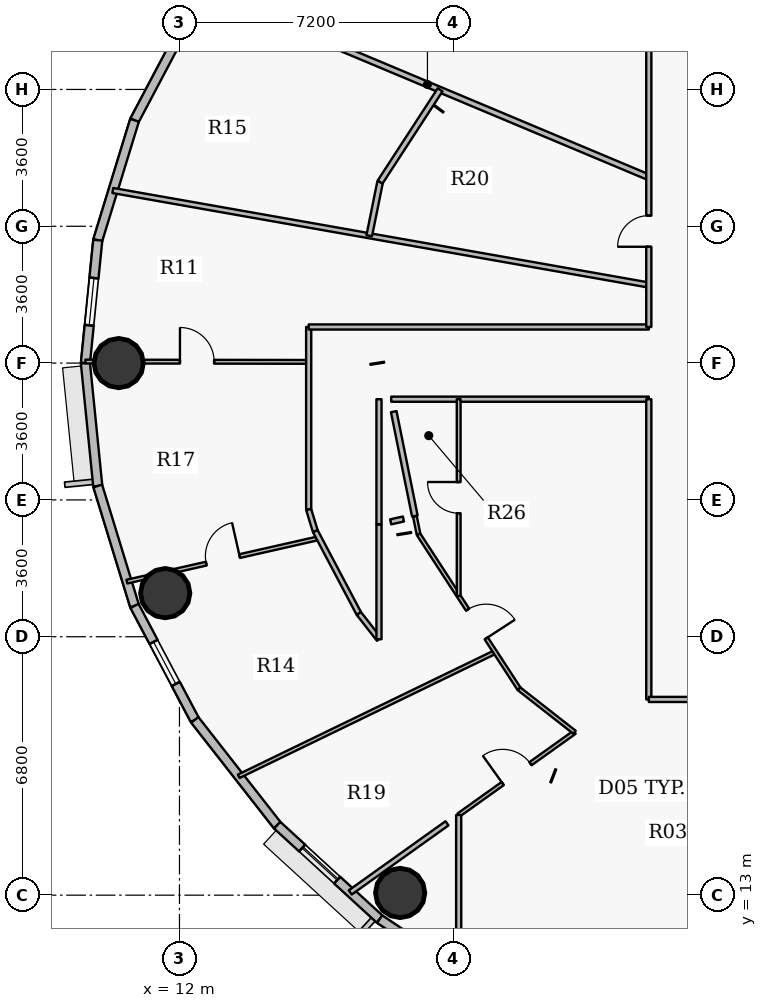
"""IFC4 building model, lengths in metres.
Left out: names, types, materials, properties, quantities, classifications, styles, units other than length and angle.
Written with IfcOpenShell. Run it as: python <this file> out.ifc"""

import sys

from ifc_helpers import new_model, si_unit, direction, frame, frame_2d, origin, origin_2d, place, context, subcontext, project, spatial, rectangle, hollow_circle, extrude, source, transform, mapped, element, fill, save


model = new_model("IFC4")
c1 = context("Model", 3, precision=1e-05, world=origin(), true_north=direction((0.0, 1.0)))
c2 = subcontext(c1, "Body", "Model", "MODEL_VIEW")
j1 = project(units=[si_unit("LENGTHUNIT", "METRE"), si_unit("PLANEANGLEUNIT", "RADIAN")], contexts=[c1])
p1 = place(None, origin())
s1 = spatial("IfcSite", under=j1, at=p1, CompositionType="ELEMENT")
p2 = place(p1, origin())
s2 = spatial("IfcBuilding", under=s1, at=p2, CompositionType="ELEMENT")
p3 = place(p2, frame((0.0, 0.0, 189.9)))
s3 = spatial("IfcBuildingStorey", under=s2, at=p3, CompositionType="ELEMENT", Elevation=189.9)
for number, where, z_axis, x_axis in (
    (1, (10.4, 27.0, 0.0), (0.0, 0.0, 1.0), (1.0, 0.0, 0.0)),
    (2, (11.625, 20.947, 0.0), (0.0, 0.0, 1.0), (1.0, 0.0, 0.0)),
    (3, (17.808, 13.058, 0.0), (0.0, 0.0, 1.0), (1.0, 0.0, 0.0)),
):
    element("IfcColumn", number, at=place(p3, frame(where, z_axis=z_axis, x_axis=x_axis)), inside=s3, PredefinedType="COLUMN", context=c2, shape_type="SweptSolid", body=[
        extrude(hollow_circle(Radius=0.65, WallThickness=0.04, at=origin_2d()), origin(), (0.0, 0.0, 1.0), 3.75),
    ])
p4 = place(p3, frame((10.817, 33.389, 0.0), z_axis=(0.0, 0.0, 1.0), x_axis=(0.467586874938, 0.88394712194, 0.0)))
e4 = element("IfcWall", 4, at=p4, inside=s3, PredefinedType="SOLIDWALL", context=c2, shape_type="SweptSolid", body=[
    extrude(rectangle(XDim=3.393, YDim=0.24, at=frame_2d((1.697, 0.0))), origin(), (0.0, 0.0, 1.0), 3.5),
])
p5 = place(p3, frame((9.85, 30.234, 0.0), z_axis=(0.0, 0.0, 1.0), x_axis=(0.293097995113, 0.956082405058, 0.0)))
e5 = element("IfcWall", 5, at=p5, inside=s3, PredefinedType="SOLIDWALL", context=c2, shape_type="SweptSolid", body=[
    extrude(rectangle(XDim=3.3, YDim=0.24, at=frame_2d((1.65, 0.0))), origin(), (0.0, 0.0, 1.0), 3.5),
])
p6 = place(p3, frame((9.525, 27.0, 0.0), z_axis=(0.0, 0.0, 1.0), x_axis=(0.100061534614, 0.994981250723, 0.0)))
e6 = element("IfcWall", 6, at=p6, inside=s3, PredefinedType="SOLIDWALL", context=c2, shape_type="SweptSolid", body=[
    extrude(rectangle(XDim=3.25, YDim=0.24, at=frame_2d((1.625, 0.0))), origin(), (0.0, 0.0, 1.0), 3.5),
])
p7 = place(p6, frame((1.0, 0.0, 0.9)))
e7 = element("IfcOpeningElement", 7, at=p7, cuts=e6, PredefinedType="OPENING", context=c2, shape_type="SweptSolid", body=[
    extrude(rectangle(XDim=1.25, YDim=1.65, at=origin_2d()), frame((0.625, 0.13, 0.825), z_axis=(0.0, -1.0, 0.0), x_axis=(1.0, 0.0, 0.0)), (0.0, 0.0, 1.0), 0.26),
])
p8 = place(p3, frame((9.85, 23.766, 0.0), z_axis=(0.0, 0.0, 1.0), x_axis=(-0.100061534614, 0.994981250723, 0.0)))
e8 = element("IfcWall", 8, at=p8, inside=s3, PredefinedType="SOLIDWALL", context=c2, shape_type="SweptSolid", body=[
    extrude(rectangle(XDim=3.25, YDim=0.24, at=frame_2d((1.625, 0.0))), origin(), (0.0, 0.0, 1.0), 3.5),
])
p9 = place(p3, frame((10.817, 20.611, 0.0), z_axis=(0.0, 0.0, 1.0), x_axis=(-0.293097995113, 0.956082405058, 0.0)))
e9 = element("IfcWall", 9, at=p9, inside=s3, PredefinedType="SOLIDWALL", context=c2, shape_type="SweptSolid", body=[
    extrude(rectangle(XDim=3.3, YDim=0.24, at=frame_2d((1.65, 0.0))), origin(), (0.0, 0.0, 1.0), 3.5),
])
p10 = place(p3, frame((12.404, 17.612, 0.0), z_axis=(0.0, 0.0, 1.0), x_axis=(-0.467586874938, 0.88394712194, 0.0)))
e10 = element("IfcWall", 10, at=p10, inside=s3, PredefinedType="SOLIDWALL", context=c2, shape_type="SweptSolid", body=[
    extrude(rectangle(XDim=3.393, YDim=0.24, at=frame_2d((1.697, 0.0))), origin(), (0.0, 0.0, 1.0), 3.5),
])
p11 = place(p10, frame((1.072, 0.0, 0.9)))
e11 = element("IfcOpeningElement", 11, at=p11, cuts=e10, PredefinedType="OPENING", context=c2, shape_type="SweptSolid", body=[
    extrude(rectangle(XDim=1.25, YDim=1.65, at=origin_2d()), frame((0.625, 0.13, 0.825), z_axis=(0.0, -1.0, 0.0), x_axis=(1.0, 0.0, 0.0)), (0.0, 0.0, 1.0), 0.26),
])
p12 = place(p3, frame((14.572, 14.842, 0.0), z_axis=(0.0, 0.0, 1.0), x_axis=(-0.616287674549, 0.787521112224, 0.0)))
e12 = element("IfcWall", 12, at=p12, inside=s3, PredefinedType="SOLIDWALL", context=c2, shape_type="SweptSolid", body=[
    extrude(rectangle(XDim=3.517, YDim=0.24, at=frame_2d((1.759, 0.0))), origin(), (0.0, 0.0, 1.0), 3.5),
])
p13 = place(p3, frame((17.268, 12.369, 0.0), z_axis=(0.0, 0.0, 1.0), x_axis=(-0.737076565834, 0.675809245349, 0.0)))
e13 = element("IfcWall", 13, at=p13, inside=s3, PredefinedType="SOLIDWALL", context=c2, shape_type="SweptSolid", body=[
    extrude(rectangle(XDim=3.658, YDim=0.24, at=frame_2d((1.829, 0.0))), origin(), (0.0, 0.0, 1.0), 3.5),
])
p14 = place(p13, frame((1.518, 0.0, 0.9)))
e14 = element("IfcOpeningElement", 14, at=p14, cuts=e13, PredefinedType="OPENING", context=c2, shape_type="SweptSolid", body=[
    extrude(rectangle(XDim=1.25, YDim=1.65, at=origin_2d()), frame((0.625, 0.13, 0.825), z_axis=(0.0, -1.0, 0.0), x_axis=(1.0, 0.0, 0.0)), (0.0, 0.0, 1.0), 0.26),
])
p15 = place(p3, frame((20.427, 10.257, 0.0), z_axis=(0.0, 0.0, 1.0), x_axis=(-0.831228998277, 0.555930168657, 0.0)))
e15 = element("IfcWall", 15, at=p15, inside=s3, PredefinedType="SOLIDWALL", context=c2, shape_type="SweptSolid", body=[
    extrude(rectangle(XDim=3.8, YDim=0.24, at=frame_2d((1.9, 0.0))), origin(), (0.0, 0.0, 1.0), 3.5),
])
p16 = place(p3, frame((9.524, 27.041, 0.0), z_axis=(0.0, 0.0, 1.0), x_axis=(0.999998818241, -0.001537373012, 0.0)))
e16 = element("IfcWall", 16, at=p16, inside=s3, PredefinedType="PARTITIONING", context=c2, shape_type="SweptSolid", body=[
    extrude(rectangle(XDim=5.876, YDim=0.1, at=frame_2d((2.938, 0.0))), origin(), (0.0, 0.0, 1.0), 2.935),
])
p17 = place(p16, frame((2.488, 0.0, 0.0)))
e17 = element("IfcOpeningElement", 17, at=p17, cuts=e16, PredefinedType="OPENING", context=c2, shape_type="SweptSolid", body=[
    extrude(rectangle(XDim=0.9, YDim=2.1, at=origin_2d()), frame((0.45, 0.06, 1.05), z_axis=(0.0, -1.0, 0.0), x_axis=(1.0, 0.0, 0.0)), (0.0, 0.0, 1.0), 0.12),
])
p18 = place(p3, frame((10.246, 31.541, 0.0), z_axis=(0.0, 0.0, 1.0), x_axis=(0.984807060168, -0.173652106936, 0.0)))
e18 = element("IfcWall", 18, at=p18, inside=s3, PredefinedType="PARTITIONING", context=c2, shape_type="SweptSolid", body=[
    extrude(rectangle(XDim=14.322, YDim=0.135, at=frame_2d((7.161, 0.0))), origin(), (0.0, 0.0, 1.0), 2.935),
])
p19 = place(p3, frame((10.616, 21.25, 0.0), z_axis=(0.0, 0.0, 1.0), x_axis=(0.975289939743, 0.220928797208, 0.0)))
e19 = element("IfcWall", 19, at=p19, inside=s3, PredefinedType="PARTITIONING", context=c2, shape_type="SweptSolid", body=[
    extrude(rectangle(XDim=5.183, YDim=0.1, at=frame_2d((2.591, 0.0))), origin(), (0.0, 0.0, 1.0), 2.935),
])
p20 = place(p19, frame((2.141, 0.0, 0.0)))
e20 = element("IfcOpeningElement", 20, at=p20, cuts=e19, PredefinedType="OPENING", context=c2, shape_type="SweptSolid", body=[
    extrude(rectangle(XDim=0.9, YDim=2.1, at=origin_2d()), frame((0.45, 0.06, 1.05), z_axis=(0.0, -1.0, 0.0), x_axis=(1.0, 0.0, 0.0)), (0.0, 0.0, 1.0), 0.12),
])
p21 = place(p3, frame((12.7, 36.775, 0.0), z_axis=(0.0, 0.0, 1.0), x_axis=(0.922134788074, -0.386868753745, 0.0)))
e21 = element("IfcWall", 21, at=p21, inside=s3, PredefinedType="PARTITIONING", context=c2, shape_type="SweptSolid", body=[
    extrude(rectangle(XDim=12.633, YDim=0.15, at=frame_2d((6.317, 0.0))), origin(), (0.0, 0.0, 1.0), 2.935),
])
p22 = place(p21, frame((2.834, 0.0, 0.0)))
e22 = element("IfcOpeningElement", 22, at=p22, cuts=e21, PredefinedType="OPENING", context=c2, shape_type="SweptSolid", body=[
    extrude(rectangle(XDim=1.05, YDim=2.15, at=origin_2d()), frame((0.525, 0.085, 1.075), z_axis=(0.0, -1.0, 0.0), x_axis=(1.0, 0.0, 0.0)), (0.0, 0.0, 1.0), 0.17),
])
p23 = place(p3, frame((13.559, 16.128, 0.0), z_axis=(0.0, 0.0, 1.0), x_axis=(0.899957370901, 0.43597790146, 0.0)))
e23 = element("IfcWall", 23, at=p23, inside=s3, PredefinedType="PARTITIONING", context=c2, shape_type="SweptSolid", body=[
    extrude(rectangle(XDim=7.498, YDim=0.1, at=frame_2d((3.749, 0.0))), origin(), (0.0, 0.0, 1.0), 2.935),
])
p24 = place(p3, frame((15.4, 23.146, 0.0), z_axis=(0.0, 0.0, 1.0), x_axis=(0.0, 1.0, 0.0)))
e24 = element("IfcWall", 24, at=p24, inside=s3, PredefinedType="PARTITIONING", context=c2, shape_type="SweptSolid", body=[
    extrude(rectangle(XDim=4.804, YDim=0.135, at=frame_2d((2.402, 0.0))), origin(), (0.0, 0.0, 1.0), 2.935),
])
p25 = place(p3, frame((15.4, 23.146, 0.0), z_axis=(0.0, 0.0, 1.0), x_axis=(0.293335154151, -0.956009669061, 0.0)))
e25 = element("IfcWall", 25, at=p25, inside=s3, PredefinedType="PARTITIONING", context=c2, shape_type="SweptSolid", body=[
    extrude(rectangle(XDim=0.594, YDim=0.135, at=frame_2d((0.297, 0.0))), origin(), (0.0, 0.0, 1.0), 3.5),
])
p26 = place(p3, frame((15.4, 27.95, 0.0), z_axis=(0.0, 0.0, 1.0), x_axis=(1.0, 0.0, 0.0)))
e26 = element("IfcWall", 26, at=p26, inside=s3, PredefinedType="PARTITIONING", context=c2, shape_type="SweptSolid", body=[
    extrude(rectangle(XDim=8.95, YDim=0.135, at=frame_2d((4.475, 0.0))), origin(), (0.0, 0.0, 1.0), 3.5),
])
p27 = place(p3, frame((15.574, 22.578, 0.0), z_axis=(0.0, 0.0, 1.0), x_axis=(0.467613130075, -0.883933233102, 0.0)))
e27 = element("IfcWall", 27, at=p27, inside=s3, PredefinedType="PARTITIONING", context=c2, shape_type="SweptSolid", body=[
    extrude(rectangle(XDim=2.451, YDim=0.135, at=frame_2d((1.226, 0.0))), origin(), (0.0, 0.0, 1.0), 2.935),
])
p28 = place(p3, frame((16.72, 20.411, 0.0), z_axis=(0.0, 0.0, 1.0), x_axis=(0.616377221056, -0.787451027914, 0.0)))
e28 = element("IfcWall", 28, at=p28, inside=s3, PredefinedType="PARTITIONING", context=c2, shape_type="SweptSolid", body=[
    extrude(rectangle(XDim=0.859, YDim=0.135, at=frame_2d((0.43, 0.0))), origin(), (0.0, 0.0, 1.0), 3.5),
])
p29 = place(p3, frame((16.994, 30.351, 0.0), z_axis=(0.0, 0.0, 1.0), x_axis=(0.198136589313, 0.98017441916, 0.0)))
e29 = element("IfcWall", 29, at=p29, inside=s3, PredefinedType="PARTITIONING", context=c2, shape_type="SweptSolid", body=[
    extrude(rectangle(XDim=1.44, YDim=0.15, at=frame_2d((0.72, 0.0))), origin(), (0.0, 0.0, 1.0), 3.5),
])
p30 = place(p3, frame((17.25, 19.734, 0.0), z_axis=(0.0, 0.0, 1.0), x_axis=(0.0, 1.0, 0.0)))
e30 = element("IfcWall", 30, at=p30, inside=s3, PredefinedType="PARTITIONING", context=c2, shape_type="SweptSolid", body=[
    extrude(rectangle(XDim=3.018, YDim=0.135, at=frame_2d((1.509, 0.0))), origin(), (0.0, 0.0, 1.0), 2.935),
])
p31 = place(p3, frame((17.279, 31.763, 0.0), z_axis=(0.0, 0.0, 1.0), x_axis=(0.545388220317, 0.8381835653, 0.0)))
e31 = element("IfcWall", 31, at=p31, inside=s3, PredefinedType="PARTITIONING", context=c2, shape_type="SweptSolid", body=[
    extrude(rectangle(XDim=2.897, YDim=0.15, at=frame_2d((1.448, 0.0))), origin(), (0.0, 0.0, 1.0), 2.935),
])
p32 = place(p3, frame((17.572, 26.05, 0.0), z_axis=(0.0, 0.0, 1.0), x_axis=(1.0, 0.0, 0.0)))
e32 = element("IfcWall", 32, at=p32, inside=s3, PredefinedType="PARTITIONING", context=c2, shape_type="SweptSolid", body=[
    extrude(rectangle(XDim=6.778, YDim=0.135, at=frame_2d((3.389, 0.0))), origin(), (0.0, 0.0, 1.0), 3.5),
])
p33 = place(p3, frame((18.196, 22.967, 0.0), z_axis=(0.0, 0.0, 1.0), x_axis=(0.197965751338, -0.980208937573, 0.0)))
e33 = element("IfcWall", 33, at=p33, inside=s3, PredefinedType="PARTITIONING", context=c2, shape_type="SweptSolid", body=[
    extrude(rectangle(XDim=0.482, YDim=0.1, at=frame_2d((0.241, 0.0))), origin(), (0.0, 0.0, 1.0), 2.935),
])
p34 = place(p3, frame((18.291, 22.494, 0.0), z_axis=(0.0, 0.0, 1.0), x_axis=(0.545382906853, -0.838187022634, 0.0)))
e34 = element("IfcWall", 34, at=p34, inside=s3, PredefinedType="PARTITIONING", context=c2, shape_type="SweptSolid", body=[
    extrude(rectangle(XDim=4.849, YDim=0.1, at=frame_2d((2.425, 0.0))), origin(), (0.0, 0.0, 1.0), 2.935),
])
p35 = place(p34, frame((2.365, 0.0, 0.0)))
e35 = element("IfcOpeningElement", 35, at=p35, cuts=e34, PredefinedType="OPENING", context=c2, shape_type="SweptSolid", body=[
    extrude(rectangle(XDim=0.9, YDim=2.1, at=origin_2d()), frame((0.45, 0.06, 1.05), z_axis=(0.0, -1.0, 0.0), x_axis=(1.0, 0.0, 0.0)), (0.0, 0.0, 1.0), 0.12),
])
p36 = place(p3, frame((19.347, 15.11, 0.0), z_axis=(0.0, 0.0, 1.0), x_axis=(0.813856749582, 0.581065565285, 0.0)))
e36 = element("IfcWall", 36, at=p36, inside=s3, PredefinedType="PARTITIONING", context=c2, shape_type="SweptSolid", body=[
    extrude(rectangle(XDim=3.746, YDim=0.1, at=frame_2d((1.873, 0.0))), origin(), (0.0, 0.0, 1.0), 3.5),
])
p37 = place(p36, frame((1.423, 0.0, 0.0)))
e37 = element("IfcOpeningElement", 37, at=p37, cuts=e36, PredefinedType="OPENING", context=c2, shape_type="SweptSolid", body=[
    extrude(rectangle(XDim=0.9, YDim=2.1, at=origin_2d()), frame((0.45, 0.06, 1.05), z_axis=(0.0, -1.0, 0.0), x_axis=(1.0, 0.0, 0.0)), (0.0, 0.0, 1.0), 0.12),
])
p38 = place(p3, frame((19.347, 20.871, 0.0), z_axis=(0.0, 0.0, 1.0), x_axis=(0.0, 1.0, 0.0)))
e38 = element("IfcWall", 38, at=p38, inside=s3, PredefinedType="PARTITIONING", context=c2, shape_type="SweptSolid", body=[
    extrude(rectangle(XDim=5.179, YDim=0.1, at=frame_2d((2.589, 0.0))), origin(), (0.0, 0.0, 1.0), 2.935),
])
p39 = place(p38, frame((2.179, 0.0, 0.0)))
e39 = element("IfcOpeningElement", 39, at=p39, cuts=e38, PredefinedType="OPENING", context=c2, shape_type="SweptSolid", body=[
    extrude(rectangle(XDim=0.82, YDim=2.1, at=origin_2d()), frame((0.41, 0.06, 1.05), z_axis=(0.0, -1.0, 0.0), x_axis=(1.0, 0.0, 0.0)), (0.0, 0.0, 1.0), 0.12),
])
p40 = place(p3, frame((20.936, 18.429, 0.0), z_axis=(0.0, 0.0, 1.0), x_axis=(0.787377174631, -0.616471560472, 0.0)))
e40 = element("IfcWall", 40, at=p40, inside=s3, PredefinedType="PARTITIONING", context=c2, shape_type="SweptSolid", body=[
    extrude(rectangle(XDim=1.854, YDim=0.1, at=frame_2d((0.927, 0.0))), origin(), (0.0, 0.0, 1.0), 3.5),
])
p41 = place(p3, frame((24.35, 18.15, 0.0), z_axis=(0.0, 0.0, 1.0), x_axis=(0.0, 1.0, 0.0)))
e41 = element("IfcWall", 41, at=p41, inside=s3, PredefinedType="PARTITIONING", context=c2, shape_type="SweptSolid", body=[
    extrude(rectangle(XDim=7.9, YDim=0.135, at=frame_2d((3.95, 0.0))), origin(), (0.0, 0.0, 1.0), 2.935),
])
p42 = place(p3, frame((24.35, 18.15, 0.0), z_axis=(0.0, 0.0, 1.0), x_axis=(1.0, 0.0, 0.0)))
e42 = element("IfcWall", 42, at=p42, inside=s3, PredefinedType="PARTITIONING", context=c2, shape_type="SweptSolid", body=[
    extrude(rectangle(XDim=9.109, YDim=0.135, at=frame_2d((4.554, 0.0))), origin(), (0.0, 0.0, 1.0), 2.935),
])
p43 = place(p42, frame((4.054, 0.0, 0.0)))
e43 = element("IfcOpeningElement", 43, at=p43, cuts=e42, PredefinedType="OPENING", context=c2, shape_type="SweptSolid", body=[
    extrude(rectangle(XDim=1.0, YDim=2.15, at=origin_2d()), frame((0.5, 0.078, 1.075), z_axis=(0.0, -1.0, 0.0), x_axis=(1.0, 0.0, 0.0)), (0.0, 0.0, 1.0), 0.155),
])
p44 = place(p3, frame((24.35, 27.95, 0.0), z_axis=(0.0, 0.0, 1.0), x_axis=(0.0, 1.0, 0.0)))
e44 = element("IfcWall", 44, at=p44, inside=s3, PredefinedType="PARTITIONING", context=c2, shape_type="SweptSolid", body=[
    extrude(rectangle(XDim=7.9, YDim=0.135, at=frame_2d((3.95, 0.0))), origin(), (0.0, 0.0, 1.0), 2.935),
])
p45 = place(p44, frame((2.111, 0.0, 0.0)))
e45 = element("IfcOpeningElement", 45, at=p45, cuts=e44, PredefinedType="OPENING", context=c2, shape_type="SweptSolid", body=[
    extrude(rectangle(XDim=0.82, YDim=2.1, at=origin_2d()), frame((0.41, 0.078, 1.05), z_axis=(0.0, -1.0, 0.0), x_axis=(1.0, 0.0, 0.0)), (0.0, 0.0, 1.0), 0.155),
])
p46 = place(p3, frame((24.497, 8.38, 0.0), z_axis=(0.0, 0.0, 1.0), x_axis=(0.525599261466, 0.850732282417, 0.0)))
e46 = element("IfcWall", 46, at=p46, inside=s3, PredefinedType="PARTITIONING", context=c2, shape_type="SweptSolid", body=[
    extrude(rectangle(XDim=6.645, YDim=0.1, at=frame_2d((3.322, 0.0))), origin(), (0.0, 0.0, 1.0), 2.935),
])
p47 = place(p46, frame((2.872, 0.0, 0.0)))
e47 = element("IfcOpeningElement", 47, at=p47, cuts=e46, PredefinedType="OPENING", context=c2, shape_type="SweptSolid", body=[
    extrude(rectangle(XDim=0.9, YDim=2.1, at=origin_2d()), frame((0.45, 0.06, 1.05), z_axis=(0.0, -1.0, 0.0), x_axis=(1.0, 0.0, 0.0)), (0.0, 0.0, 1.0), 0.12),
])
p48 = place(p3, frame((17.25, 26.05, 0.0), z_axis=(0.0, 0.0, 1.0), x_axis=(0.0, -1.0, 0.0)))
e48 = element("IfcWall", 48, at=p48, inside=s3, PredefinedType="PARTITIONING", context=c2, shape_type="SweptSolid", body=[
    extrude(rectangle(XDim=3.288, YDim=0.135, at=frame_2d((1.644, 0.0))), origin(), (0.0, 0.0, 1.0), 2.985),
])
p49 = place(p3, frame((19.347, 10.973, 0.0), z_axis=(0.0, 0.0, 1.0), x_axis=(0.0, 1.0, 0.0)))
e49 = element("IfcWall", 49, at=p49, inside=s3, PredefinedType="PARTITIONING", context=c2, shape_type="SweptSolid", body=[
    extrude(rectangle(XDim=4.137, YDim=0.135, at=frame_2d((2.068, 0.0))), origin(), (0.0, 0.0, 1.0), 2.935),
])
p50 = place(p3, frame((17.558, 22.822, 0.0), z_axis=(0.0, 0.0, 1.0), x_axis=(0.975362278784, 0.220609213601, 0.0)))
e50 = element("IfcWall", 50, at=p50, inside=s3, PredefinedType="PARTITIONING", context=c2, shape_type="SweptSolid", body=[
    extrude(rectangle(XDim=0.344, YDim=0.135, at=frame_2d((0.172, 0.0))), origin(), (0.0, 0.0, 1.0), 2.985),
])
p51 = place(p3, frame((19.04, 14.89, 0.0), z_axis=(0.0, 0.0, 1.0), x_axis=(-0.813828377049, -0.5811053026, 0.0)))
e51 = element("IfcWall", 51, at=p51, inside=s3, PredefinedType="PARTITIONING", context=c2, shape_type="SweptSolid", body=[
    extrude(rectangle(XDim=3.128, YDim=0.135, at=frame_2d((1.564, 0.0))), origin(), (0.0, 0.0, 1.0), 2.935),
])
p52 = place(p3, frame((18.194, 22.977, 0.0), z_axis=(0.0, 0.0, 1.0), x_axis=(-0.19826083806, 0.980149294797, 0.0)))
e52 = element("IfcWall", 52, at=p52, inside=s3, PredefinedType="PARTITIONING", context=c2, shape_type="SweptSolid", body=[
    extrude(rectangle(XDim=2.802, YDim=0.15, at=frame_2d((1.401, 0.0))), origin(), (0.0, 0.0, 1.0), 2.985),
])
m1 = source(origin(), c2, "Body", "SweptSolid", [
    extrude(rectangle(XDim=1.25, YDim=1.65, at=origin_2d()), frame((0.625, 0.03, 0.825), z_axis=(0.0, -1.0, 0.0), x_axis=(1.0, 0.0, 0.0)), (0.0, 0.0, 1.0), 0.06),
])
p53 = place(p14, origin())
e53 = element("IfcWindow", 53, at=p53, inside=s3, PartitioningType="SINGLE_PANEL", PredefinedType="WINDOW", context=c2, shape_type="MappedRepresentation", body=[
    mapped(m1, transform((0.0, 0.0, 0.0), x_axis=(1.0, 0.0, 0.0), y_axis=(0.0, 1.0, 0.0), z_axis=(0.0, 0.0, 1.0), scale=1.0)),
])
fill(e14, e53)
p54 = place(p7, origin())
e54 = element("IfcWindow", 54, at=p54, inside=s3, PartitioningType="SINGLE_PANEL", PredefinedType="WINDOW", context=c2, shape_type="MappedRepresentation", body=[
    mapped(m1, transform((0.0, 0.0, 0.0), x_axis=(1.0, 0.0, 0.0), y_axis=(0.0, 1.0, 0.0), z_axis=(0.0, 0.0, 1.0), scale=1.0)),
])
fill(e7, e54)
p55 = place(p11, origin())
e55 = element("IfcWindow", 55, at=p55, inside=s3, PartitioningType="SINGLE_PANEL", PredefinedType="WINDOW", context=c2, shape_type="MappedRepresentation", body=[
    mapped(m1, transform((0.0, 0.0, 0.0), x_axis=(1.0, 0.0, 0.0), y_axis=(0.0, 1.0, 0.0), z_axis=(0.0, 0.0, 1.0), scale=1.0)),
])
fill(e11, e55)
m2 = source(origin(), c2, "Body", "SweptSolid", [
    extrude(rectangle(XDim=0.9, YDim=2.1, at=origin_2d()), frame((0.45, 0.025, 1.05), z_axis=(0.0, -1.0, 0.0), x_axis=(1.0, 0.0, 0.0)), (0.0, 0.0, 1.0), 0.05),
])
p56 = place(p35, origin())
e56 = element("IfcDoor", 56, at=p56, inside=s3, OperationType="SINGLE_SWING_RIGHT", PredefinedType="DOOR", context=c2, shape_type="MappedRepresentation", body=[
    mapped(m2, transform((0.0, 0.0, 0.0), x_axis=(1.0, 0.0, 0.0), y_axis=(0.0, 1.0, 0.0), z_axis=(0.0, 0.0, 1.0), scale=1.0)),
])
fill(e35, e56)
p57 = place(p37, origin())
e57 = element("IfcDoor", 57, at=p57, inside=s3, OperationType="SINGLE_SWING_LEFT", PredefinedType="DOOR", context=c2, shape_type="MappedRepresentation", body=[
    mapped(m2, transform((0.0, 0.0, 0.0), x_axis=(1.0, 0.0, 0.0), y_axis=(0.0, 1.0, 0.0), z_axis=(0.0, 0.0, 1.0), scale=1.0)),
])
fill(e37, e57)
m3 = source(origin(), c2, "Body", "SweptSolid", [
    extrude(rectangle(XDim=0.82, YDim=2.1, at=origin_2d()), frame((0.41, 0.025, 1.05), z_axis=(0.0, -1.0, 0.0), x_axis=(1.0, 0.0, 0.0)), (0.0, 0.0, 1.0), 0.05),
])
p58 = place(p39, origin())
e58 = element("IfcDoor", 58, at=p58, inside=s3, OperationType="SINGLE_SWING_RIGHT", PredefinedType="DOOR", context=c2, shape_type="MappedRepresentation", body=[
    mapped(m3, transform((0.0, 0.0, 0.0), x_axis=(1.0, 0.0, 0.0), y_axis=(0.0, 1.0, 0.0), z_axis=(0.0, 0.0, 1.0), scale=1.0)),
])
fill(e39, e58)
p59 = place(p20, origin())
e59 = element("IfcDoor", 59, at=p59, inside=s3, OperationType="SINGLE_SWING_RIGHT", PredefinedType="DOOR", context=c2, shape_type="MappedRepresentation", body=[
    mapped(m2, transform((0.0, 0.0, 0.0), x_axis=(1.0, 0.0, 0.0), y_axis=(0.0, 1.0, 0.0), z_axis=(0.0, 0.0, 1.0), scale=1.0)),
])
fill(e20, e59)
p60 = place(p17, origin())
e60 = element("IfcDoor", 60, at=p60, inside=s3, OperationType="SINGLE_SWING_LEFT", PredefinedType="DOOR", context=c2, shape_type="MappedRepresentation", body=[
    mapped(m2, transform((0.0, 0.0, 0.0), x_axis=(1.0, 0.0, 0.0), y_axis=(0.0, 1.0, 0.0), z_axis=(0.0, 0.0, 1.0), scale=1.0)),
])
fill(e17, e60)
p61 = place(p45, origin())
e61 = element("IfcDoor", 61, at=p61, inside=s3, OperationType="SINGLE_SWING_LEFT", PredefinedType="DOOR", context=c2, shape_type="MappedRepresentation", body=[
    mapped(m3, transform((0.0, 0.0, 0.0), x_axis=(1.0, 0.0, 0.0), y_axis=(0.0, 1.0, 0.0), z_axis=(0.0, 0.0, 1.0), scale=1.0)),
])
fill(e45, e61)
save(model, sys.argv[1])
